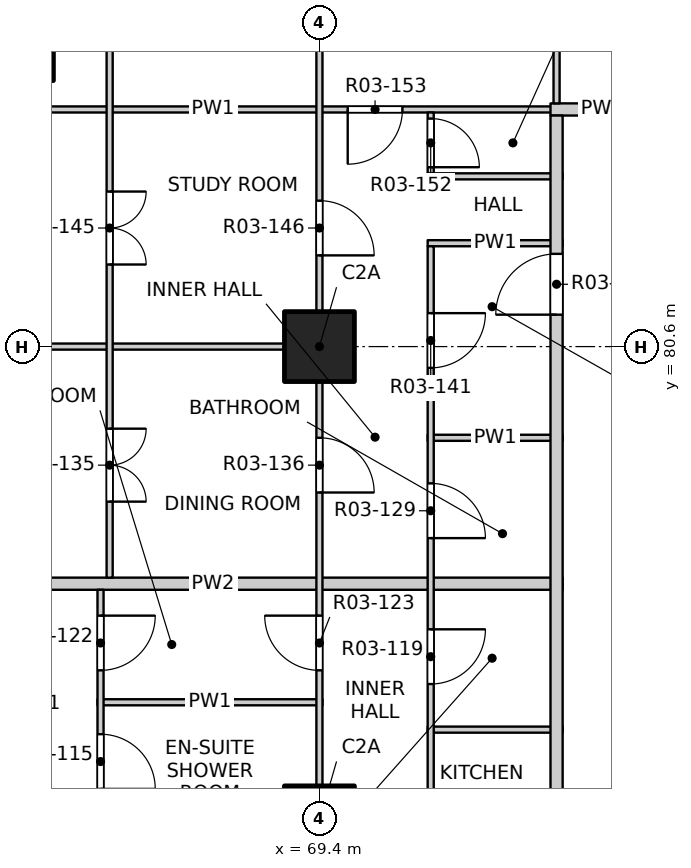
"""IFC4 building model, lengths in metres.
Left out: names, types, materials, properties, quantities, classifications, styles, units other than length and angle.
Written with IfcOpenShell. Run it as: python <this file> out.ifc"""

import sys

from ifc_helpers import new_model, si_unit, direction, frame, frame_2d, origin, origin_2d, place, context, subcontext, project, spatial, rectangle, extrude, element, fill, save


model = new_model("IFC4")
c1 = context("Model", 3, precision=1e-05, world=origin(), true_north=direction((0.0, 1.0)))
c2 = subcontext(c1, "Body", "Model", "MODEL_VIEW")
j1 = project(units=[si_unit("LENGTHUNIT", "METRE"), si_unit("PLANEANGLEUNIT", "RADIAN")], contexts=[c1])
p1 = place(None, origin())
s1 = spatial("IfcSite", under=j1, at=p1, CompositionType="ELEMENT")
p2 = place(p1, origin())
s2 = spatial("IfcBuilding", under=s1, at=p2, CompositionType="ELEMENT")
p3 = place(p2, frame((0.0, 0.0, 39.9)))
s3 = spatial("IfcBuildingStorey", under=s2, at=p3, CompositionType="ELEMENT", Elevation=39.9)
p4 = place(p3, frame((64.5, 85.5, -0.25), z_axis=(0.0, 0.0, 1.0), x_axis=(1.0, 0.0, 0.0)))
e1 = element("IfcColumn", 1, at=p4, inside=s3, PredefinedType="COLUMN", context=c2, shape_type="SweptSolid", body=[
    extrude(rectangle(XDim=1.05, YDim=1.05, at=origin_2d()), origin(), (0.0, 0.0, 1.0), 3.4),
])
for number, where, z_axis, x_axis in (
    (2, (69.4, 72.8, -0.25), (0.0, 0.0, 1.0), (1.0, 0.0, 0.0)),
    (3, (69.4, 80.6, -0.25), (0.0, 0.0, 1.0), (1.0, 0.0, 0.0)),
):
    element("IfcColumn", number, at=place(p3, frame(where, z_axis=z_axis, x_axis=x_axis)), inside=s3, PredefinedType="COLUMN", context=c2, shape_type="SweptSolid", body=[
        extrude(rectangle(XDim=1.15, YDim=1.15, at=origin_2d()), origin(), (0.0, 0.0, 1.0), 3.4),
    ])
p5 = place(p3, frame((71.18, 74.3, 0.0), z_axis=(0.0, 0.0, 1.0), x_axis=(1.0, 0.0, 0.0)))
e4 = element("IfcWall", 4, at=p5, inside=s3, PredefinedType="PARTITIONING", context=c2, shape_type="SweptSolid", body=[
    extrude(rectangle(XDim=2.22, YDim=0.1, at=frame_2d((1.11, 0.0))), origin(), (0.0, 0.0, 1.0), 3.15),
])
p6 = place(p3, frame((65.75, 74.75, 0.0), z_axis=(0.0, 0.0, 1.0), x_axis=(1.0, 0.0, 0.0)))
e5 = element("IfcWall", 5, at=p6, inside=s3, PredefinedType="PARTITIONING", context=c2, shape_type="SweptSolid", body=[
    extrude(rectangle(XDim=3.7, YDim=0.1, at=frame_2d((1.85, 0.0))), origin(), (0.0, 0.0, 1.0), 3.15),
])
p7 = place(p3, frame((61.9, 76.7, 0.0), z_axis=(0.0, 0.0, 1.0), x_axis=(1.0, 0.0, 0.0)))
e6 = element("IfcWall", 6, at=p7, inside=s3, PredefinedType="PARTITIONING", context=c2, shape_type="SweptSolid", body=[
    extrude(rectangle(XDim=11.5, YDim=0.2, at=frame_2d((5.75, 0.0))), origin(), (0.0, 0.0, 1.0), 3.15),
])
p8 = place(p3, frame((71.18, 79.1, 0.0), z_axis=(0.0, 0.0, 1.0), x_axis=(1.0, 0.0, 0.0)))
e7 = element("IfcWall", 7, at=p8, inside=s3, PredefinedType="PARTITIONING", context=c2, shape_type="SweptSolid", body=[
    extrude(rectangle(XDim=2.22, YDim=0.1, at=frame_2d((1.11, 0.0))), origin(), (0.0, 0.0, 1.0), 3.15),
])
p9 = place(p3, frame((61.9, 80.6, 0.0), z_axis=(0.0, 0.0, 1.0), x_axis=(1.0, 0.0, 0.0)))
e8 = element("IfcWall", 8, at=p9, inside=s3, PredefinedType="PARTITIONING", context=c2, shape_type="SweptSolid", body=[
    extrude(rectangle(XDim=7.55, YDim=0.1, at=frame_2d((3.775, 0.0))), origin(), (0.0, 0.0, 1.0), 2.55),
])
for number, where, z_axis, x_axis in (
    (9, (71.18, 82.3, 0.0), (0.0, 0.0, 1.0), (1.0, 0.0, 0.0)),
    (10, (71.18, 83.4, 0.0), (0.0, 0.0, 1.0), (1.0, 0.0, 0.0)),
):
    element("IfcWall", number, at=place(p3, frame(where, z_axis=z_axis, x_axis=x_axis)), inside=s3, PredefinedType="PARTITIONING", context=c2, shape_type="SweptSolid", body=[
        extrude(rectangle(XDim=2.22, YDim=0.1, at=frame_2d((1.11, 0.0))), origin(), (0.0, 0.0, 1.0), 3.15),
    ])
p10 = place(p3, frame((61.9, 84.5, 0.0), z_axis=(0.0, 0.0, 1.0), x_axis=(1.0, 0.0, 0.0)))
e11 = element("IfcWall", 11, at=p10, inside=s3, PredefinedType="PARTITIONING", context=c2, shape_type="SweptSolid", body=[
    extrude(rectangle(XDim=11.5, YDim=0.1, at=frame_2d((5.75, 0.0))), origin(), (0.0, 0.0, 1.0), 3.15),
])
p11 = place(p10, frame((7.965, 0.0, 0.0)))
e12 = element("IfcOpeningElement", 12, at=p11, cuts=e11, PredefinedType="OPENING", context=c2, shape_type="SweptSolid", body=[
    extrude(rectangle(XDim=0.9, YDim=2.1, at=frame_2d((0.45, 1.05))), frame((0.0, 0.06, 0.0), z_axis=(0.0, -1.0, 0.0), x_axis=(1.0, 0.0, 0.0)), (0.0, 0.0, 1.0), 0.12),
])
p12 = place(p3, frame((73.2, 84.5, 0.0), z_axis=(0.0, 0.0, 1.0), x_axis=(1.0, 0.0, 0.0)))
e13 = element("IfcWall", 13, at=p12, inside=s3, PredefinedType="PARTITIONING", context=c2, shape_type="SweptSolid", body=[
    extrude(rectangle(XDim=1.7, YDim=0.2, at=frame_2d((0.85, 0.0))), origin(), (0.0, 0.0, 1.0), 3.15),
])
p13 = place(p3, frame((65.8, 69.0, 0.0), z_axis=(0.0, 0.0, 1.0), x_axis=(0.0, 1.0, 0.0)))
e14 = element("IfcWall", 14, at=p13, inside=s3, PredefinedType="PARTITIONING", context=c2, shape_type="SweptSolid", body=[
    extrude(rectangle(XDim=7.6, YDim=0.1, at=frame_2d((3.8, 0.0))), origin(), (0.0, 0.0, 1.0), 3.15),
])
p14 = place(p13, frame((1.25, 0.0, 0.0)))
e15 = element("IfcOpeningElement", 15, at=p14, cuts=e14, PredefinedType="OPENING", context=c2, shape_type="SweptSolid", body=[
    extrude(rectangle(XDim=1.2, YDim=2.1, at=frame_2d((0.6, 1.05))), frame((0.0, 0.06, 0.0), z_axis=(0.0, -1.0, 0.0), x_axis=(1.0, 0.0, 0.0)), (0.0, 0.0, 1.0), 0.12),
])
p15 = place(p13, frame((4.325, 0.0, 0.0)))
e16 = element("IfcOpeningElement", 16, at=p15, cuts=e14, PredefinedType="OPENING", context=c2, shape_type="SweptSolid", body=[
    extrude(rectangle(XDim=0.9, YDim=2.1, at=frame_2d((0.45, 1.05))), frame((0.0, 0.06, 0.0), z_axis=(0.0, -1.0, 0.0), x_axis=(1.0, 0.0, 0.0)), (0.0, 0.0, 1.0), 0.12),
])
p16 = place(p13, frame((6.275, 0.0, 0.0)))
e17 = element("IfcOpeningElement", 17, at=p16, cuts=e14, PredefinedType="OPENING", context=c2, shape_type="SweptSolid", body=[
    extrude(rectangle(XDim=0.9, YDim=2.1, at=frame_2d((0.45, 1.05))), frame((0.0, 0.06, 0.0), z_axis=(0.0, -1.0, 0.0), x_axis=(1.0, 0.0, 0.0)), (0.0, 0.0, 1.0), 0.12),
])
p17 = place(p3, frame((65.95, 76.8, 0.0), z_axis=(0.0, 0.0, 1.0), x_axis=(0.0, 1.0, 0.0)))
e18 = element("IfcWall", 18, at=p17, inside=s3, PredefinedType="PARTITIONING", context=c2, shape_type="SweptSolid", body=[
    extrude(rectangle(XDim=11.3, YDim=0.1, at=frame_2d((5.65, 0.0))), origin(), (0.0, 0.0, 1.0), 3.15),
])
p18 = place(p17, frame((1.25, 0.0, 0.0)))
e19 = element("IfcOpeningElement", 19, at=p18, cuts=e18, PredefinedType="OPENING", context=c2, shape_type="SweptSolid", body=[
    extrude(rectangle(XDim=1.2, YDim=2.1, at=frame_2d((0.6, 1.05))), frame((0.0, 0.06, 0.0), z_axis=(0.0, -1.0, 0.0), x_axis=(1.0, 0.0, 0.0)), (0.0, 0.0, 1.0), 0.12),
])
p19 = place(p17, frame((5.15, 0.0, 0.0)))
e20 = element("IfcOpeningElement", 20, at=p19, cuts=e18, PredefinedType="OPENING", context=c2, shape_type="SweptSolid", body=[
    extrude(rectangle(XDim=1.2, YDim=2.1, at=frame_2d((0.6, 1.05))), frame((0.0, 0.06, 0.0), z_axis=(0.0, -1.0, 0.0), x_axis=(1.0, 0.0, 0.0)), (0.0, 0.0, 1.0), 0.12),
])
p20 = place(p17, frame((9.05, 0.0, 0.0)))
e21 = element("IfcOpeningElement", 21, at=p20, cuts=e18, PredefinedType="OPENING", context=c2, shape_type="SweptSolid", body=[
    extrude(rectangle(XDim=1.2, YDim=2.1, at=frame_2d((0.6, 1.05))), frame((0.0, 0.06, 0.0), z_axis=(0.0, -1.0, 0.0), x_axis=(1.0, 0.0, 0.0)), (0.0, 0.0, 1.0), 0.12),
])
p21 = place(p3, frame((69.4, 41.9, 0.0), z_axis=(0.0, 0.0, 1.0), x_axis=(0.0, 1.0, 0.0)))
e22 = element("IfcWall", 22, at=p21, inside=s3, PredefinedType="PARTITIONING", context=c2, shape_type="SweptSolid", body=[
    extrude(rectangle(XDim=46.2, YDim=0.1, at=frame_2d((23.1, 0.0))), origin(), (0.0, 0.0, 1.0), 3.15),
])
p22 = place(p21, frame((1.2, 0.0, 0.0)))
e23 = element("IfcOpeningElement", 23, at=p22, cuts=e22, PredefinedType="OPENING", context=c2, shape_type="SweptSolid", body=[
    extrude(rectangle(XDim=0.9, YDim=2.1, at=frame_2d((0.45, 1.05))), frame((0.0, 0.06, 0.0), z_axis=(0.0, -1.0, 0.0), x_axis=(1.0, 0.0, 0.0)), (0.0, 0.0, 1.0), 0.12),
])
p23 = place(p21, frame((5.9, 0.0, 0.0)))
e24 = element("IfcOpeningElement", 24, at=p23, cuts=e22, PredefinedType="OPENING", context=c2, shape_type="SweptSolid", body=[
    extrude(rectangle(XDim=0.9, YDim=2.1, at=frame_2d((0.45, 1.05))), frame((0.0, 0.06, 0.0), z_axis=(0.0, -1.0, 0.0), x_axis=(1.0, 0.0, 0.0)), (0.0, 0.0, 1.0), 0.12),
])
p24 = place(p21, frame((9.0, 0.0, 0.0)))
e25 = element("IfcOpeningElement", 25, at=p24, cuts=e22, PredefinedType="OPENING", context=c2, shape_type="SweptSolid", body=[
    extrude(rectangle(XDim=0.9, YDim=2.1, at=frame_2d((0.45, 1.05))), frame((0.0, 0.06, 0.0), z_axis=(0.0, -1.0, 0.0), x_axis=(1.0, 0.0, 0.0)), (0.0, 0.0, 1.0), 0.12),
])
p25 = place(p21, frame((13.725, 0.0, 0.0)))
e26 = element("IfcOpeningElement", 26, at=p25, cuts=e22, PredefinedType="OPENING", context=c2, shape_type="SweptSolid", body=[
    extrude(rectangle(XDim=0.9, YDim=2.1, at=frame_2d((0.45, 1.05))), frame((0.0, 0.06, 0.0), z_axis=(0.0, -1.0, 0.0), x_axis=(1.0, 0.0, 0.0)), (0.0, 0.0, 1.0), 0.12),
])
p26 = place(p21, frame((17.775, 0.0, 0.0)))
e27 = element("IfcOpeningElement", 27, at=p26, cuts=e22, PredefinedType="OPENING", context=c2, shape_type="SweptSolid", body=[
    extrude(rectangle(XDim=0.9, YDim=2.1, at=frame_2d((0.45, 1.05))), frame((0.0, 0.06, 0.0), z_axis=(0.0, -1.0, 0.0), x_axis=(1.0, 0.0, 0.0)), (0.0, 0.0, 1.0), 0.12),
])
p27 = place(p21, frame((20.7, 0.0, 0.0)))
e28 = element("IfcOpeningElement", 28, at=p27, cuts=e22, PredefinedType="OPENING", context=c2, shape_type="SweptSolid", body=[
    extrude(rectangle(XDim=0.9, YDim=2.1, at=frame_2d((0.45, 1.05))), frame((0.0, 0.06, 0.0), z_axis=(0.0, -1.0, 0.0), x_axis=(1.0, 0.0, 0.0)), (0.0, 0.0, 1.0), 0.12),
])
p28 = place(p21, frame((25.575, 0.0, 0.0)))
e29 = element("IfcOpeningElement", 29, at=p28, cuts=e22, PredefinedType="OPENING", context=c2, shape_type="SweptSolid", body=[
    extrude(rectangle(XDim=0.9, YDim=2.1, at=frame_2d((0.45, 1.05))), frame((0.0, 0.06, 0.0), z_axis=(0.0, -1.0, 0.0), x_axis=(1.0, 0.0, 0.0)), (0.0, 0.0, 1.0), 0.12),
])
p29 = place(p21, frame((28.5, 0.0, 0.0)))
e30 = element("IfcOpeningElement", 30, at=p29, cuts=e22, PredefinedType="OPENING", context=c2, shape_type="SweptSolid", body=[
    extrude(rectangle(XDim=0.9, YDim=2.1, at=frame_2d((0.45, 1.05))), frame((0.0, 0.06, 0.0), z_axis=(0.0, -1.0, 0.0), x_axis=(1.0, 0.0, 0.0)), (0.0, 0.0, 1.0), 0.12),
])
p30 = place(p21, frame((33.375, 0.0, 0.0)))
e31 = element("IfcOpeningElement", 31, at=p30, cuts=e22, PredefinedType="OPENING", context=c2, shape_type="SweptSolid", body=[
    extrude(rectangle(XDim=0.9, YDim=2.1, at=frame_2d((0.45, 1.05))), frame((0.0, 0.06, 0.0), z_axis=(0.0, -1.0, 0.0), x_axis=(1.0, 0.0, 0.0)), (0.0, 0.0, 1.0), 0.12),
])
p31 = place(p21, frame((36.3, 0.0, 0.0)))
e32 = element("IfcOpeningElement", 32, at=p31, cuts=e22, PredefinedType="OPENING", context=c2, shape_type="SweptSolid", body=[
    extrude(rectangle(XDim=0.9, YDim=2.1, at=frame_2d((0.45, 1.05))), frame((0.0, 0.06, 0.0), z_axis=(0.0, -1.0, 0.0), x_axis=(1.0, 0.0, 0.0)), (0.0, 0.0, 1.0), 0.12),
])
p32 = place(p21, frame((40.2, 0.0, 0.0)))
e33 = element("IfcOpeningElement", 33, at=p32, cuts=e22, PredefinedType="OPENING", context=c2, shape_type="SweptSolid", body=[
    extrude(rectangle(XDim=0.9, YDim=2.1, at=frame_2d((0.45, 1.05))), frame((0.0, 0.06, 0.0), z_axis=(0.0, -1.0, 0.0), x_axis=(1.0, 0.0, 0.0)), (0.0, 0.0, 1.0), 0.12),
])
p33 = place(p21, frame((44.1, 0.0, 0.0)))
e34 = element("IfcOpeningElement", 34, at=p33, cuts=e22, PredefinedType="OPENING", context=c2, shape_type="SweptSolid", body=[
    extrude(rectangle(XDim=0.9, YDim=2.1, at=frame_2d((0.45, 1.05))), frame((0.0, 0.06, 0.0), z_axis=(0.0, -1.0, 0.0), x_axis=(1.0, 0.0, 0.0)), (0.0, 0.0, 1.0), 0.12),
])
p34 = place(p3, frame((71.23, 71.3, 0.0), z_axis=(0.0, 0.0, 1.0), x_axis=(0.0, 1.0, 0.0)))
e35 = element("IfcWall", 35, at=p34, inside=s3, PredefinedType="PARTITIONING", context=c2, shape_type="SweptSolid", body=[
    extrude(rectangle(XDim=10.95, YDim=0.1, at=frame_2d((5.475, 0.0))), origin(), (0.0, 0.0, 1.0), 3.15),
])
p35 = place(p34, frame((1.025, 0.0, 0.0)))
e36 = element("IfcOpeningElement", 36, at=p35, cuts=e35, PredefinedType="OPENING", context=c2, shape_type="SweptSolid", body=[
    extrude(rectangle(XDim=0.9, YDim=2.1, at=frame_2d((0.45, 1.05))), frame((0.0, 0.06, 0.0), z_axis=(0.0, -1.0, 0.0), x_axis=(1.0, 0.0, 0.0)), (0.0, 0.0, 1.0), 0.12),
])
p36 = place(p34, frame((3.75, 0.0, 0.0)))
e37 = element("IfcOpeningElement", 37, at=p36, cuts=e35, PredefinedType="OPENING", context=c2, shape_type="SweptSolid", body=[
    extrude(rectangle(XDim=0.9, YDim=2.1, at=frame_2d((0.45, 1.05))), frame((0.0, 0.06, 0.0), z_axis=(0.0, -1.0, 0.0), x_axis=(1.0, 0.0, 0.0)), (0.0, 0.0, 1.0), 0.12),
])
p37 = place(p34, frame((6.15, 0.0, 0.0)))
e38 = element("IfcOpeningElement", 38, at=p37, cuts=e35, PredefinedType="OPENING", context=c2, shape_type="SweptSolid", body=[
    extrude(rectangle(XDim=0.9, YDim=2.1, at=frame_2d((0.45, 1.05))), frame((0.0, 0.06, 0.0), z_axis=(0.0, -1.0, 0.0), x_axis=(1.0, 0.0, 0.0)), (0.0, 0.0, 1.0), 0.12),
])
p38 = place(p34, frame((8.95, 0.0, 0.0)))
e39 = element("IfcOpeningElement", 39, at=p38, cuts=e35, PredefinedType="OPENING", context=c2, shape_type="SweptSolid", body=[
    extrude(rectangle(XDim=0.9, YDim=2.1, at=frame_2d((0.45, 1.05))), frame((0.0, 0.06, 0.0), z_axis=(0.0, -1.0, 0.0), x_axis=(1.0, 0.0, 0.0)), (0.0, 0.0, 1.0), 0.12),
])
p39 = place(p3, frame((71.23, 83.45, 0.0), z_axis=(0.0, 0.0, 1.0), x_axis=(0.0, 1.0, 0.0)))
e40 = element("IfcWall", 40, at=p39, inside=s3, PredefinedType="PARTITIONING", context=c2, shape_type="SweptSolid", body=[
    extrude(rectangle(XDim=1.0, YDim=0.1, at=frame_2d((0.5, 0.0))), origin(), (0.0, 0.0, 1.0), 3.15),
])
p40 = place(p39, frame((0.1, 0.0, 0.0)))
e41 = element("IfcOpeningElement", 41, at=p40, cuts=e40, PredefinedType="OPENING", context=c2, shape_type="SweptSolid", body=[
    extrude(rectangle(XDim=0.8, YDim=2.1, at=frame_2d((0.4, 1.05))), frame((0.0, 0.06, 0.0), z_axis=(0.0, -1.0, 0.0), x_axis=(1.0, 0.0, 0.0)), (0.0, 0.0, 1.0), 0.12),
])
p41 = place(p3, frame((73.3, 53.4, 0.0), z_axis=(0.0, 0.0, 1.0), x_axis=(0.0, 1.0, 0.0)))
e42 = element("IfcWall", 42, at=p41, inside=s3, PredefinedType="PARTITIONING", context=c2, shape_type="SweptSolid", body=[
    extrude(rectangle(XDim=31.0, YDim=0.2, at=frame_2d((15.5, 0.0))), origin(), (0.0, 0.0, 1.0), 3.15),
])
p42 = place(p41, frame((5.775, 0.0, 0.0)))
e43 = element("IfcOpeningElement", 43, at=p42, cuts=e42, PredefinedType="OPENING", context=c2, shape_type="SweptSolid", body=[
    extrude(rectangle(XDim=1.0, YDim=2.1, at=frame_2d((0.5, 1.05))), frame((0.0, 0.11, 0.0), z_axis=(0.0, -1.0, 0.0), x_axis=(1.0, 0.0, 0.0)), (0.0, 0.0, 1.0), 0.22),
])
p43 = place(p41, frame((10.875, 0.0, 0.0)))
e44 = element("IfcOpeningElement", 44, at=p43, cuts=e42, PredefinedType="OPENING", context=c2, shape_type="SweptSolid", body=[
    extrude(rectangle(XDim=1.0, YDim=2.1, at=frame_2d((0.5, 1.05))), frame((0.0, 0.11, 0.0), z_axis=(0.0, -1.0, 0.0), x_axis=(1.0, 0.0, 0.0)), (0.0, 0.0, 1.0), 0.22),
])
p44 = place(p41, frame((18.025, 0.0, 0.0)))
e45 = element("IfcOpeningElement", 45, at=p44, cuts=e42, PredefinedType="OPENING", context=c2, shape_type="SweptSolid", body=[
    extrude(rectangle(XDim=1.0, YDim=2.1, at=frame_2d((0.5, 1.05))), frame((0.0, 0.11, 0.0), z_axis=(0.0, -1.0, 0.0), x_axis=(1.0, 0.0, 0.0)), (0.0, 0.0, 1.0), 0.22),
])
p45 = place(p41, frame((27.725, 0.0, 0.0)))
e46 = element("IfcOpeningElement", 46, at=p45, cuts=e42, PredefinedType="OPENING", context=c2, shape_type="SweptSolid", body=[
    extrude(rectangle(XDim=1.0, YDim=2.1, at=frame_2d((0.5, 1.05))), frame((0.0, 0.11, 0.0), z_axis=(0.0, -1.0, 0.0), x_axis=(1.0, 0.0, 0.0)), (0.0, 0.0, 1.0), 0.22),
])
p46 = place(p3, frame((73.3, 84.6, 0.0), z_axis=(0.0, 0.0, 1.0), x_axis=(0.0, 1.0, 0.0)))
e47 = element("IfcWall", 47, at=p46, inside=s3, PredefinedType="PARTITIONING", context=c2, shape_type="SweptSolid", body=[
    extrude(rectangle(XDim=3.5, YDim=0.1, at=frame_2d((1.75, 0.0))), origin(), (0.0, 0.0, 1.0), 3.15),
])
p47 = place(p46, frame((1.4, 0.0, 0.0)))
e48 = element("IfcOpeningElement", 48, at=p47, cuts=e47, PredefinedType="OPENING", context=c2, shape_type="SweptSolid", body=[
    extrude(rectangle(XDim=0.9, YDim=2.1, at=frame_2d((0.45, 1.05))), frame((0.0, 0.06, 0.0), z_axis=(0.0, -1.0, 0.0), x_axis=(1.0, 0.0, 0.0)), (0.0, 0.0, 1.0), 0.12),
])
p48 = place(p15, origin())
e49 = element("IfcDoor", 49, at=p48, inside=s3, OperationType="SINGLE_SWING_RIGHT", PredefinedType="DOOR", context=c2, shape_type="SweptSolid", body=[
    extrude(rectangle(XDim=0.9, YDim=2.1, at=frame_2d((0.45, 1.05))), frame((0.0, 0.025, 0.0), z_axis=(0.0, -1.0, 0.0), x_axis=(1.0, 0.0, 0.0)), (0.0, 0.0, 1.0), 0.05),
])
fill(e16, e49)
p49 = place(p36, origin())
e50 = element("IfcDoor", 50, at=p49, inside=s3, OperationType="SINGLE_SWING_LEFT", PredefinedType="DOOR", context=c2, shape_type="SweptSolid", body=[
    extrude(rectangle(XDim=0.9, YDim=2.1, at=frame_2d((0.45, 1.05))), frame((0.0, 0.025, 0.0), z_axis=(0.0, -1.0, 0.0), x_axis=(1.0, 0.0, 0.0)), (0.0, 0.0, 1.0), 0.05),
])
fill(e37, e50)
p50 = place(p16, origin())
e51 = element("IfcDoor", 51, at=p50, inside=s3, OperationType="SINGLE_SWING_LEFT", PredefinedType="DOOR", context=c2, shape_type="SweptSolid", body=[
    extrude(rectangle(XDim=0.9, YDim=2.1, at=frame_2d((0.45, 1.05))), frame((0.0, 0.025, 0.0), z_axis=(0.0, -1.0, 0.0), x_axis=(1.0, 0.0, 0.0)), (0.0, 0.0, 1.0), 0.05),
])
fill(e17, e51)
p51 = place(p30, origin())
e52 = element("IfcDoor", 52, at=p51, inside=s3, OperationType="SINGLE_SWING_RIGHT", PredefinedType="DOOR", context=c2, shape_type="SweptSolid", body=[
    extrude(rectangle(XDim=0.9, YDim=2.1, at=frame_2d((0.45, 1.05))), frame((0.0, 0.025, 0.0), z_axis=(0.0, -1.0, 0.0), x_axis=(1.0, 0.0, 0.0)), (0.0, 0.0, 1.0), 0.05),
])
fill(e31, e52)
p52 = place(p37, origin())
e53 = element("IfcDoor", 53, at=p52, inside=s3, OperationType="SINGLE_SWING_RIGHT", PredefinedType="DOOR", context=c2, shape_type="SweptSolid", body=[
    extrude(rectangle(XDim=0.9, YDim=2.1, at=frame_2d((0.45, 1.05))), frame((0.0, 0.025, 0.0), z_axis=(0.0, -1.0, 0.0), x_axis=(1.0, 0.0, 0.0)), (0.0, 0.0, 1.0), 0.05),
])
fill(e38, e53)
p53 = place(p18, origin())
e54 = element("IfcDoor", 54, at=p53, inside=s3, OperationType="DOUBLE_DOOR_SINGLE_SWING", PredefinedType="DOOR", context=c2, shape_type="SweptSolid", body=[
    extrude(rectangle(XDim=1.2, YDim=2.1, at=frame_2d((0.6, 1.05))), frame((0.0, 0.025, 0.0), z_axis=(0.0, -1.0, 0.0), x_axis=(1.0, 0.0, 0.0)), (0.0, 0.0, 1.0), 0.05),
])
fill(e19, e54)
p54 = place(p31, origin())
e55 = element("IfcDoor", 55, at=p54, inside=s3, OperationType="SINGLE_SWING_RIGHT", PredefinedType="DOOR", context=c2, shape_type="SweptSolid", body=[
    extrude(rectangle(XDim=0.9, YDim=2.1, at=frame_2d((0.45, 1.05))), frame((0.0, 0.025, 0.0), z_axis=(0.0, -1.0, 0.0), x_axis=(1.0, 0.0, 0.0)), (0.0, 0.0, 1.0), 0.05),
])
fill(e32, e55)
p55 = place(p38, origin())
e56 = element("IfcDoor", 56, at=p55, inside=s3, OperationType="SINGLE_SWING_LEFT", PredefinedType="DOOR", context=c2, shape_type="SweptSolid", body=[
    extrude(rectangle(XDim=0.9, YDim=2.1, at=frame_2d((0.45, 1.05))), frame((0.0, 0.025, 0.0), z_axis=(0.0, -1.0, 0.0), x_axis=(1.0, 0.0, 0.0)), (0.0, 0.0, 1.0), 0.05),
])
fill(e39, e56)
p56 = place(p45, origin())
e57 = element("IfcDoor", 57, at=p56, inside=s3, OperationType="SINGLE_SWING_LEFT", PredefinedType="DOOR", context=c2, shape_type="SweptSolid", body=[
    extrude(rectangle(XDim=1.0, YDim=2.1, at=frame_2d((0.5, 1.05))), frame((0.0, 0.025, 0.0), z_axis=(0.0, -1.0, 0.0), x_axis=(1.0, 0.0, 0.0)), (0.0, 0.0, 1.0), 0.05),
])
fill(e46, e57)
p57 = place(p19, origin())
e58 = element("IfcDoor", 58, at=p57, inside=s3, OperationType="DOUBLE_DOOR_SINGLE_SWING", PredefinedType="DOOR", context=c2, shape_type="SweptSolid", body=[
    extrude(rectangle(XDim=1.2, YDim=2.1, at=frame_2d((0.6, 1.05))), frame((0.0, 0.025, 0.0), z_axis=(0.0, -1.0, 0.0), x_axis=(1.0, 0.0, 0.0)), (0.0, 0.0, 1.0), 0.05),
])
fill(e20, e58)
p58 = place(p32, origin())
e59 = element("IfcDoor", 59, at=p58, inside=s3, OperationType="SINGLE_SWING_RIGHT", PredefinedType="DOOR", context=c2, shape_type="SweptSolid", body=[
    extrude(rectangle(XDim=0.9, YDim=2.1, at=frame_2d((0.45, 1.05))), frame((0.0, 0.025, 0.0), z_axis=(0.0, -1.0, 0.0), x_axis=(1.0, 0.0, 0.0)), (0.0, 0.0, 1.0), 0.05),
])
fill(e33, e59)
p59 = place(p40, origin())
e60 = element("IfcDoor", 60, at=p59, inside=s3, OperationType="SINGLE_SWING_RIGHT", PredefinedType="DOOR", context=c2, shape_type="SweptSolid", body=[
    extrude(rectangle(XDim=0.8, YDim=2.1, at=frame_2d((0.4, 1.05))), frame((0.0, 0.025, 0.0), z_axis=(0.0, -1.0, 0.0), x_axis=(1.0, 0.0, 0.0)), (0.0, 0.0, 1.0), 0.05),
])
fill(e41, e60)
p60 = place(p11, origin())
e61 = element("IfcDoor", 61, at=p60, inside=s3, OperationType="SINGLE_SWING_RIGHT", PredefinedType="DOOR", context=c2, shape_type="SweptSolid", body=[
    extrude(rectangle(XDim=0.9, YDim=2.1, at=frame_2d((0.45, 1.05))), frame((0.0, 0.025, 0.0), z_axis=(0.0, -1.0, 0.0), x_axis=(1.0, 0.0, 0.0)), (0.0, 0.0, 1.0), 0.05),
])
fill(e12, e61)
save(model, sys.argv[1])
